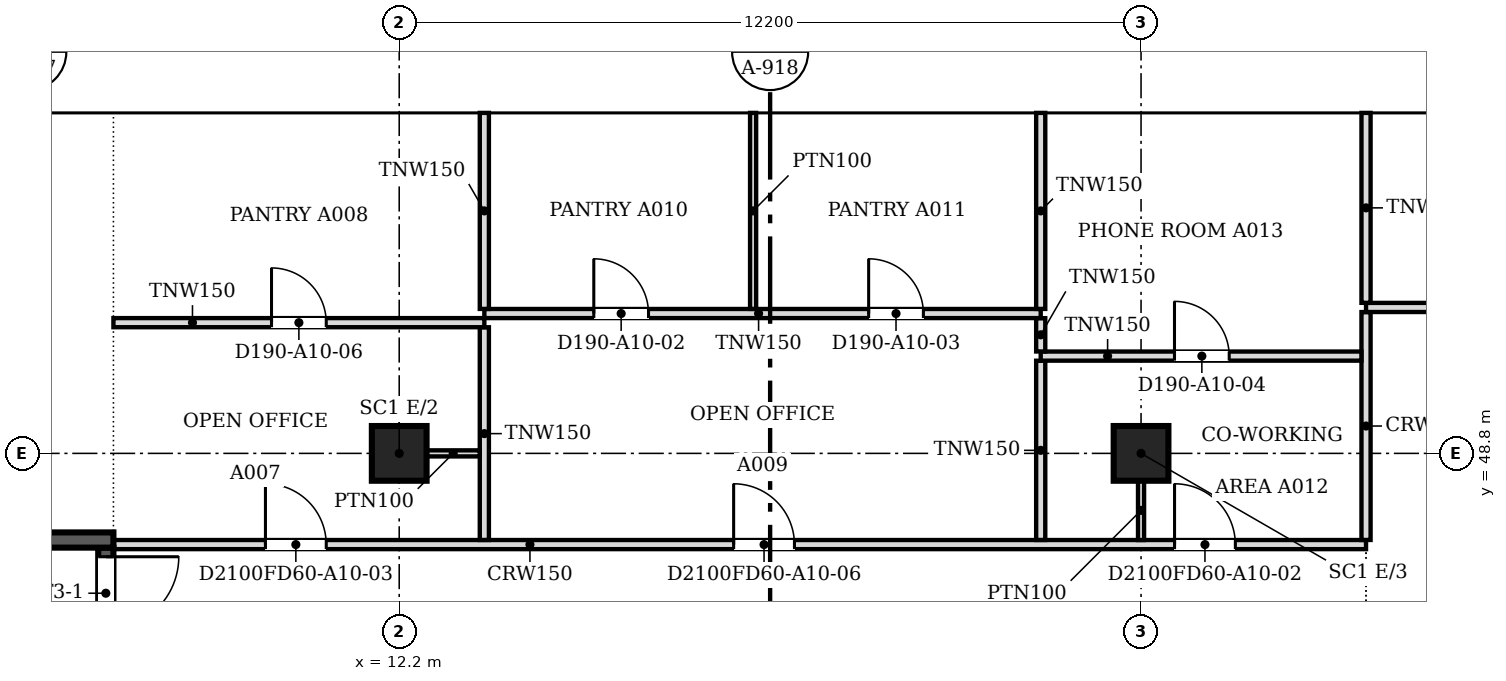
"""IFC4 building model, lengths in metres.
Left out: names, types, materials, properties, quantities, classifications, styles, units other than length and angle.
Written with IfcOpenShell. Run it as: python <this file> out.ifc"""

import sys

from ifc_helpers import new_model, si_unit, direction, frame, frame_2d, origin, origin_2d, place, context, subcontext, project, spatial, polyline, rectangle, outline, extrude, faceted_brep, source, transform, mapped, element, fill, save


model = new_model("IFC4")
c1 = context("Model", 3, precision=1e-05, world=origin(), true_north=direction((0.0, 1.0)))
c2 = subcontext(c1, "Body", "Model", "MODEL_VIEW")
j1 = project(units=[si_unit("LENGTHUNIT", "METRE"), si_unit("PLANEANGLEUNIT", "RADIAN")], contexts=[c1])
p1 = place(None, origin())
s1 = spatial("IfcSite", under=j1, at=p1, CompositionType="ELEMENT")
p2 = place(p1, origin())
s2 = spatial("IfcBuilding", under=s1, at=p2, CompositionType="ELEMENT")
p3 = place(p2, frame((0.0, 0.0, 112.6)))
s3 = spatial("IfcBuildingStorey", under=s2, at=p3, CompositionType="ELEMENT", Elevation=112.6)
for number, where, z_axis, x_axis in (
    (1, (12.2, 48.8, 0.0), (0.0, 0.0, 1.0), (1.0, 0.0, 0.0)),
    (2, (24.4, 48.8, 0.0), (0.0, 0.0, 1.0), (1.0, 0.0, 0.0)),
):
    element("IfcColumn", number, at=place(p3, frame(where, z_axis=z_axis, x_axis=x_axis)), inside=s3, PredefinedType="COLUMN", context=c2, shape_type="SweptSolid", body=[
        extrude(rectangle(XDim=0.9, YDim=0.9, at=origin_2d()), origin(), (0.0, 0.0, 1.0), 3.6),
    ])
m1 = source(origin(), c2, "Body", "SweptSolid", [
    extrude(outline(polyline([(6.1, 0.0), (3.05, 3.8), (0.0, 0.0), (6.1, 0.0)])), frame((0.0, 0.25, 0.0), z_axis=(0.0, -1.0, 0.0), x_axis=(1.0, 0.0, 0.0)), (0.0, 0.0, 1.0), 0.5),
])
p4 = place(p3, frame((33.55, 54.65, 0.0), z_axis=(0.0, 0.0, 1.0), x_axis=(-1.0, 0.0, 0.0)))
e3 = element("IfcWall", 3, at=p4, inside=s3, PredefinedType="SOLIDWALL", context=c2, shape_type="MappedRepresentation", body=[
    mapped(m1, transform((0.0, 0.0, 0.0), scale=1.0)),
])
m2 = source(origin(), c2, "Body", "SweptSolid", [
    extrude(outline(polyline([(5.579, 0.25), (3.05, 3.4), (0.521, 0.25), (5.579, 0.25)])), frame((0.0, 0.26, 0.0), z_axis=(0.0, -1.0, 0.0), x_axis=(1.0, 0.0, 0.0)), (0.0, 0.0, 1.0), 0.52),
])
p5 = place(p4, origin())
e4 = element("IfcOpeningElement", 4, at=p5, cuts=e3, PredefinedType="OPENING", context=c2, shape_type="MappedRepresentation", body=[
    mapped(m2, transform((0.0, 0.0, 0.0), scale=1.0)),
])
m3 = source(origin(), c2, "Body", "Brep", [
    faceted_brep([(6.1, -0.25, 0.0), (3.05, -0.25, 3.8), (0.0, -0.25, 0.0), (6.1, -0.25, 0.0), (0.0, 0.25, 0.0), (3.05, 0.25, 3.8), (6.1, 0.25, 0.0), (6.1, 0.25, 0.0)], [[[0, 1, 2, 3]], [[4, 5, 6, 7]], [[6, 5, 1, 0]], [[5, 4, 2, 1]], [[4, 7, 3, 2]], [[3, 7, 6, 0]]]),
])
p6 = place(p3, frame((27.45, 54.65, 0.0), z_axis=(0.0, 0.0, 1.0), x_axis=(-1.0, 0.0, 0.0)))
e5 = element("IfcWall", 5, at=p6, inside=s3, PredefinedType="SOLIDWALL", context=c2, shape_type="MappedRepresentation", body=[
    mapped(m3, transform((0.0, 0.0, 0.0), scale=1.0)),
])
p7 = place(p6, origin())
e6 = element("IfcOpeningElement", 6, at=p7, cuts=e5, PredefinedType="OPENING", context=c2, shape_type="MappedRepresentation", body=[
    mapped(m2, transform((0.0, 0.0, 0.0), scale=1.0)),
])
p8 = place(p3, frame((21.35, 54.65, 0.0), z_axis=(0.0, 0.0, 1.0), x_axis=(-1.0, 0.0, 0.0)))
e7 = element("IfcWall", 7, at=p8, inside=s3, PredefinedType="SOLIDWALL", context=c2, shape_type="MappedRepresentation", body=[
    mapped(m1, transform((0.0, 0.0, 0.0), scale=1.0)),
])
p9 = place(p8, origin())
e8 = element("IfcOpeningElement", 8, at=p9, cuts=e7, PredefinedType="OPENING", context=c2, shape_type="MappedRepresentation", body=[
    mapped(m2, transform((0.0, 0.0, 0.0), scale=1.0)),
])
p10 = place(p3, frame((15.25, 54.65, 0.0), z_axis=(0.0, 0.0, 1.0), x_axis=(-1.0, 0.0, 0.0)))
e9 = element("IfcWall", 9, at=p10, inside=s3, PredefinedType="SOLIDWALL", context=c2, shape_type="MappedRepresentation", body=[
    mapped(m1, transform((0.0, 0.0, 0.0), scale=1.0)),
])
p11 = place(p10, origin())
e10 = element("IfcOpeningElement", 10, at=p11, cuts=e9, PredefinedType="OPENING", context=c2, shape_type="MappedRepresentation", body=[
    mapped(m2, transform((0.0, 0.0, 0.0), scale=1.0)),
])
m4 = source(origin(), c2, "Body", "Brep", [
    faceted_brep([(3.05, -0.25, 3.74), (3.003, -0.25, 3.8), (0.0, -0.25, 0.0), (3.05, -0.25, 0.0), (0.0, 0.25, 0.0), (2.957, 0.25, 3.741), (2.957, 0.25, 0.0), (3.003, 0.0, 3.8)], [[[0, 1, 2, 3]], [[4, 5, 6]], [[7, 1, 0]], [[5, 4, 2, 1, 7]], [[4, 6, 3, 2]], [[3, 6, 5, 7, 0]]]),
])
p12 = place(p3, frame((9.15, 54.65, 0.0), z_axis=(0.0, 0.0, 1.0), x_axis=(-1.0, 0.0, 0.0)))
e11 = element("IfcWall", 11, at=p12, inside=s3, PredefinedType="SOLIDWALL", context=c2, shape_type="MappedRepresentation", body=[
    mapped(m4, transform((0.0, 0.0, 0.0), scale=1.0)),
])
m5 = source(origin(), c2, "Body", "SweptSolid", [
    extrude(outline(polyline([(2.803, 3.144), (0.516, 0.25), (2.803, 0.25), (2.803, 3.144)])), frame((0.0, 0.26, 0.0), z_axis=(0.0, -1.0, 0.0), x_axis=(1.0, 0.0, 0.0)), (0.0, 0.0, 1.0), 0.52),
])
p13 = place(p12, origin())
e12 = element("IfcOpeningElement", 12, at=p13, cuts=e11, PredefinedType="OPENING", context=c2, shape_type="MappedRepresentation", body=[
    mapped(m5, transform((0.0, 0.0, 0.0), scale=1.0)),
])
p14 = place(p2, frame((0.0, 0.0, 116.4)))
s4 = spatial("IfcBuildingStorey", under=s2, at=p14, CompositionType="ELEMENT", Elevation=116.4)
m6 = source(origin(), c2, "Body", "SweptSolid", [
    extrude(outline(polyline([(3.05, 0.0), (6.1, 3.8), (3.05, 7.6), (0.0, 3.8), (3.05, 0.0)])), frame((0.0, 0.25, 0.0), z_axis=(0.0, -1.0, 0.0), x_axis=(1.0, 0.0, 0.0)), (0.0, 0.0, 1.0), 0.5),
])
p15 = place(p14, frame((30.5, 54.65, -3.8), z_axis=(0.0, 0.0, 1.0), x_axis=(-1.0, 0.0, 0.0)))
e13 = element("IfcWall", 13, at=p15, inside=s4, PredefinedType="SOLIDWALL", context=c2, shape_type="MappedRepresentation", body=[
    mapped(m6, transform((0.0, 0.0, 0.0), scale=1.0)),
])
m7 = source(origin(), c2, "Body", "SweptSolid", [
    extrude(outline(polyline([(3.05, 0.399), (5.78, 3.8), (3.05, 7.2), (0.321, 3.8), (3.05, 0.399)])), frame((0.0, 0.26, 0.0), z_axis=(0.0, -1.0, 0.0), x_axis=(1.0, 0.0, 0.0)), (0.0, 0.0, 1.0), 0.52),
])
p16 = place(p15, origin())
e14 = element("IfcOpeningElement", 14, at=p16, cuts=e13, PredefinedType="OPENING", context=c2, shape_type="MappedRepresentation", body=[
    mapped(m7, transform((0.0, 0.0, 0.0), scale=1.0)),
])
m8 = source(origin(), c2, "Body", "Brep", [
    faceted_brep([(3.05, -0.25, 0.0), (6.1, -0.25, 3.8), (6.1, -0.25, 3.8), (3.05, -0.25, 7.6), (0.0, -0.25, 3.8), (0.0, 0.25, 3.8), (3.05, 0.25, 7.6), (6.1, 0.25, 3.8), (6.1, 0.25, 3.8), (3.05, 0.25, 0.0)], [[[0, 1, 2, 3, 4]], [[5, 6, 7, 8, 9]], [[9, 8, 1, 0]], [[7, 6, 3, 2]], [[6, 5, 4, 3]], [[5, 9, 0, 4]], [[1, 8, 7, 2]]]),
])
p17 = place(p14, frame((24.4, 54.65, -3.8), z_axis=(0.0, 0.0, 1.0), x_axis=(-1.0, 0.0, 0.0)))
e15 = element("IfcWall", 15, at=p17, inside=s4, PredefinedType="SOLIDWALL", context=c2, shape_type="MappedRepresentation", body=[
    mapped(m8, transform((0.0, 0.0, 0.0), scale=1.0)),
])
p18 = place(p17, origin())
e16 = element("IfcOpeningElement", 16, at=p18, cuts=e15, PredefinedType="OPENING", context=c2, shape_type="MappedRepresentation", body=[
    mapped(m7, transform((0.0, 0.0, 0.0), scale=1.0)),
])
p19 = place(p14, frame((18.3, 54.65, -3.8), z_axis=(0.0, 0.0, 1.0), x_axis=(-1.0, 0.0, 0.0)))
e17 = element("IfcWall", 17, at=p19, inside=s4, PredefinedType="SOLIDWALL", context=c2, shape_type="MappedRepresentation", body=[
    mapped(m6, transform((0.0, 0.0, 0.0), scale=1.0)),
])
p20 = place(p19, origin())
e18 = element("IfcOpeningElement", 18, at=p20, cuts=e17, PredefinedType="OPENING", context=c2, shape_type="MappedRepresentation", body=[
    mapped(m7, transform((0.0, 0.0, 0.0), scale=1.0)),
])
m9 = source(origin(), c2, "Body", "Brep", [
    faceted_brep([(3.05, -0.25, 0.0), (6.053, -0.25, 3.8), (3.05, -0.25, 7.6), (0.0, -0.25, 3.8), (0.0, 0.25, 3.8), (3.05, 0.25, 7.6), (6.007, 0.25, 3.859), (6.007, 0.25, 3.741), (3.05, 0.25, 0.0), (6.053, 0.0, 3.8)], [[[0, 1, 2, 3]], [[4, 5, 6, 7, 8]], [[8, 7, 9, 1, 0]], [[6, 5, 2, 1, 9]], [[5, 4, 3, 2]], [[4, 8, 0, 3]], [[9, 7, 6]]]),
])
p21 = place(p14, frame((12.2, 54.65, -3.8), z_axis=(0.0, 0.0, 1.0), x_axis=(-1.0, 0.0, 0.0)))
e19 = element("IfcWall", 19, at=p21, inside=s4, PredefinedType="SOLIDWALL", context=c2, shape_type="MappedRepresentation", body=[
    mapped(m9, transform((0.0, 0.0, 0.0), scale=1.0)),
])
m10 = source(origin(), c2, "Body", "SweptSolid", [
    extrude(outline(polyline([(3.049, 0.401), (5.735, 3.8), (3.049, 7.199), (0.321, 3.8), (3.049, 0.401)])), frame((0.0, 0.26, 0.0), z_axis=(0.0, -1.0, 0.0), x_axis=(1.0, 0.0, 0.0)), (0.0, 0.0, 1.0), 0.52),
])
p22 = place(p21, origin())
e20 = element("IfcOpeningElement", 20, at=p22, cuts=e19, PredefinedType="OPENING", context=c2, shape_type="MappedRepresentation", body=[
    mapped(m10, transform((0.0, 0.0, 0.0), scale=1.0)),
])
p23 = place(p3, frame((3.6, 47.375, 0.0), z_axis=(0.0, 0.0, 1.0), x_axis=(1.0, 0.0, 0.0)))
e21 = element("IfcWall", 21, at=p23, inside=s3, PredefinedType="SOLIDWALL", context=c2, shape_type="SweptSolid", body=[
    extrude(rectangle(XDim=3.9, YDim=0.25, at=frame_2d((1.95, 0.0))), origin(), (0.0, 0.0, 1.0), 3.8),
])
p24 = place(p3, frame((7.375, 47.25, 0.0), z_axis=(0.0, 0.0, 1.0), x_axis=(0.0, -1.0, 0.0)))
e22 = element("IfcWall", 22, at=p24, inside=s3, PredefinedType="SOLIDWALL", context=c2, shape_type="SweptSolid", body=[
    extrude(rectangle(XDim=8.0, YDim=0.25, at=frame_2d((4.0, 0.0))), origin(), (0.0, 0.0, 1.0), 3.8),
])
m11 = source(origin(), c2, "Body", "SweptSolid", [
    extrude(rectangle(XDim=1.2, YDim=2.1, at=frame_2d((0.6, 1.05))), frame((0.0, 0.135, 0.0), z_axis=(0.0, -1.0, 0.0), x_axis=(1.0, 0.0, 0.0)), (0.0, 0.0, 1.0), 0.27),
])
p25 = place(p24, frame((0.15, 0.0, 0.0)))
e23 = element("IfcOpeningElement", 23, at=p25, cuts=e22, PredefinedType="OPENING", context=c2, shape_type="MappedRepresentation", body=[
    mapped(m11, transform((0.0, 0.0, 0.0), scale=1.0)),
])
p26 = place(p3, frame((7.5, 47.3, 0.0), z_axis=(0.0, 0.0, 1.0), x_axis=(1.0, 0.0, 0.0)))
e24 = element("IfcWall", 24, at=p26, inside=s3, PredefinedType="PARTITIONING", context=c2, shape_type="SweptSolid", body=[
    extrude(rectangle(XDim=20.6, YDim=0.15, at=frame_2d((10.3, 0.0))), origin(), (0.0, 0.0, 1.0), 3.067),
])
m12 = source(origin(), c2, "Body", "SweptSolid", [
    extrude(rectangle(XDim=1.0, YDim=2.1, at=frame_2d((0.5, 1.05))), frame((0.0, 0.085, 0.0), z_axis=(0.0, -1.0, 0.0), x_axis=(1.0, 0.0, 0.0)), (0.0, 0.0, 1.0), 0.17),
])
p27 = place(p26, frame((17.451, 0.0, 0.0)))
e25 = element("IfcOpeningElement", 25, at=p27, cuts=e24, PredefinedType="OPENING", context=c2, shape_type="MappedRepresentation", body=[
    mapped(m12, transform((0.0, 0.0, 0.0), scale=1.0)),
])
p28 = place(p26, frame((2.5, 0.0, 0.0)))
e26 = element("IfcOpeningElement", 26, at=p28, cuts=e24, PredefinedType="OPENING", context=c2, shape_type="MappedRepresentation", body=[
    mapped(m12, transform((0.0, 0.0, 0.0), scale=1.0)),
])
p29 = place(p26, frame((10.2, 0.0, 0.0)))
e27 = element("IfcOpeningElement", 27, at=p29, cuts=e24, PredefinedType="OPENING", context=c2, shape_type="MappedRepresentation", body=[
    mapped(m12, transform((0.0, 0.0, 0.0), scale=1.0)),
])
p30 = place(p3, frame((13.6, 47.376, 0.0), z_axis=(0.0, 0.0, 1.0), x_axis=(0.0, 1.0, 0.0)))
e28 = element("IfcWall", 28, at=p30, inside=s3, PredefinedType="PARTITIONING", context=c2, shape_type="SweptSolid", body=[
    extrude(rectangle(XDim=3.498, YDim=0.15, at=frame_2d((1.749, 0.0))), origin(), (0.0, 0.0, 1.0), 3.067),
])
p31 = place(p3, frame((22.75, 47.376, 0.0), z_axis=(0.0, 0.0, 1.0), x_axis=(0.0, 1.0, 0.0)))
e29 = element("IfcWall", 29, at=p31, inside=s3, PredefinedType="PARTITIONING", context=c2, shape_type="SweptSolid", body=[
    extrude(rectangle(XDim=2.948, YDim=0.15, at=frame_2d((1.474, 0.0))), origin(), (0.0, 0.0, 1.0), 3.067),
])
p32 = place(p3, frame((28.1, 47.376, 0.0), z_axis=(0.0, 0.0, 1.0), x_axis=(0.0, 1.0, 0.0)))
e30 = element("IfcWall", 30, at=p32, inside=s3, PredefinedType="PARTITIONING", context=c2, shape_type="SweptSolid", body=[
    extrude(rectangle(XDim=3.748, YDim=0.15, at=frame_2d((1.874, 0.0))), origin(), (0.0, 0.0, 1.0), 3.067),
])
p33 = place(p3, frame((24.4, 48.35, 0.0), z_axis=(0.0, 0.0, 1.0), x_axis=(0.0, -1.0, 0.0)))
e31 = element("IfcWall", 31, at=p33, inside=s3, PredefinedType="PARTITIONING", context=c2, shape_type="SweptSolid", body=[
    extrude(rectangle(XDim=0.975, YDim=0.1, at=frame_2d((0.488, 0.0))), origin(), (0.0, 0.0, 1.0), 3.067),
])
p34 = place(p3, frame((12.65, 48.8, 0.0), z_axis=(0.0, 0.0, 1.0), x_axis=(1.0, 0.0, 0.0)))
e32 = element("IfcWall", 32, at=p34, inside=s3, PredefinedType="PARTITIONING", context=c2, shape_type="SweptSolid", body=[
    extrude(rectangle(XDim=0.875, YDim=0.1, at=frame_2d((0.438, 0.0))), origin(), (0.0, 0.0, 1.0), 3.067),
])
p35 = place(p3, frame((22.75, 50.4, 0.0), z_axis=(0.0, 0.0, 1.0), x_axis=(1.0, 0.0, 0.0)))
e33 = element("IfcWall", 33, at=p35, inside=s3, PredefinedType="PARTITIONING", context=c2, shape_type="SweptSolid", body=[
    extrude(rectangle(XDim=5.274, YDim=0.15, at=frame_2d((2.637, 0.0))), origin(), (0.0, 0.0, 1.0), 3.067),
])
m13 = source(origin(), c2, "Body", "SweptSolid", [
    extrude(rectangle(XDim=0.9, YDim=2.1, at=frame_2d((0.45, 1.05))), frame((0.0, 0.085, 0.0), z_axis=(0.0, -1.0, 0.0), x_axis=(1.0, 0.0, 0.0)), (0.0, 0.0, 1.0), 0.17),
])
p36 = place(p35, frame((2.2, 0.0, 0.0)))
e34 = element("IfcOpeningElement", 34, at=p36, cuts=e33, PredefinedType="OPENING", context=c2, shape_type="MappedRepresentation", body=[
    mapped(m13, transform((0.0, 0.0, 0.0), scale=1.0)),
])
p37 = place(p3, frame((22.75, 50.476, 0.0), z_axis=(0.0, 0.0, 1.0), x_axis=(0.0, 1.0, 0.0)))
e35 = element("IfcWall", 35, at=p37, inside=s3, PredefinedType="PARTITIONING", context=c2, shape_type="SweptSolid", body=[
    extrude(rectangle(XDim=0.548, YDim=0.15, at=frame_2d((0.274, 0.0))), origin(), (0.0, 0.0, 1.0), 3.067),
])
p38 = place(p3, frame((7.5, 50.95, 0.0), z_axis=(0.0, 0.0, 1.0), x_axis=(1.0, 0.0, 0.0)))
e36 = element("IfcWall", 36, at=p38, inside=s3, PredefinedType="PARTITIONING", context=c2, shape_type="SweptSolid", body=[
    extrude(rectangle(XDim=6.1, YDim=0.15, at=frame_2d((3.05, 0.0))), origin(), (0.0, 0.0, 1.0), 3.067),
])
p39 = place(p38, frame((2.6, 0.0, 0.0)))
e37 = element("IfcOpeningElement", 37, at=p39, cuts=e36, PredefinedType="OPENING", context=c2, shape_type="MappedRepresentation", body=[
    mapped(m13, transform((0.0, 0.0, 0.0), scale=1.0)),
])
p40 = place(p3, frame((13.6, 51.1, 0.0), z_axis=(0.0, 0.0, 1.0), x_axis=(1.0, 0.0, 0.0)))
e38 = element("IfcWall", 38, at=p40, inside=s3, PredefinedType="PARTITIONING", context=c2, shape_type="SweptSolid", body=[
    extrude(rectangle(XDim=9.15, YDim=0.15, at=frame_2d((4.575, 0.0))), origin(), (0.0, 0.0, 1.0), 3.067),
])
p41 = place(p40, frame((1.8, 0.0, 0.0)))
e39 = element("IfcOpeningElement", 39, at=p41, cuts=e38, PredefinedType="OPENING", context=c2, shape_type="MappedRepresentation", body=[
    mapped(m13, transform((0.0, 0.0, 0.0), scale=1.0)),
])
p42 = place(p40, frame((6.32, 0.0, 0.0)))
e40 = element("IfcOpeningElement", 40, at=p42, cuts=e38, PredefinedType="OPENING", context=c2, shape_type="MappedRepresentation", body=[
    mapped(m13, transform((0.0, 0.0, 0.0), scale=1.0)),
])
p43 = place(p3, frame((13.6, 51.176, 0.0), z_axis=(0.0, 0.0, 1.0), x_axis=(0.0, 1.0, 0.0)))
e41 = element("IfcWall", 41, at=p43, inside=s3, PredefinedType="PARTITIONING", context=c2, shape_type="SweptSolid", body=[
    extrude(rectangle(XDim=3.224, YDim=0.15, at=frame_2d((1.612, 0.0))), origin(), (0.0, 0.0, 1.0), 3.067),
])
p44 = place(p3, frame((18.02, 51.176, 0.0), z_axis=(0.0, 0.0, 1.0), x_axis=(0.0, 1.0, 0.0)))
e42 = element("IfcWall", 42, at=p44, inside=s3, PredefinedType="PARTITIONING", context=c2, shape_type="SweptSolid", body=[
    extrude(rectangle(XDim=3.224, YDim=0.1, at=frame_2d((1.612, 0.0))), origin(), (0.0, 0.0, 1.0), 3.067),
])
p45 = place(p3, frame((22.75, 51.176, 0.0), z_axis=(0.0, 0.0, 1.0), x_axis=(0.0, 1.0, 0.0)))
e43 = element("IfcWall", 43, at=p45, inside=s3, PredefinedType="PARTITIONING", context=c2, shape_type="SweptSolid", body=[
    extrude(rectangle(XDim=3.224, YDim=0.15, at=frame_2d((1.612, 0.0))), origin(), (0.0, 0.0, 1.0), 3.067),
])
p46 = place(p3, frame((28.1, 51.2, 0.0), z_axis=(0.0, 0.0, 1.0), x_axis=(1.0, 0.0, 0.0)))
e44 = element("IfcWall", 44, at=p46, inside=s3, PredefinedType="PARTITIONING", context=c2, shape_type="SweptSolid", body=[
    extrude(rectangle(XDim=31.438, YDim=0.15, at=frame_2d((15.719, 0.0))), origin(), (0.0, 0.0, 1.0), 3.067),
])
p47 = place(p46, frame((5.6, 0.0, 0.0)))
e45 = element("IfcOpeningElement", 45, at=p47, cuts=e44, PredefinedType="OPENING", context=c2, shape_type="MappedRepresentation", body=[
    mapped(m13, transform((0.0, 0.0, 0.0), scale=1.0)),
])
p48 = place(p46, frame((21.4, 0.0, 0.0)))
e46 = element("IfcOpeningElement", 46, at=p48, cuts=e44, PredefinedType="OPENING", context=c2, shape_type="MappedRepresentation", body=[
    mapped(m13, transform((0.0, 0.0, 0.0), scale=1.0)),
])
p49 = place(p3, frame((28.1, 51.276, 0.0), z_axis=(0.0, 0.0, 1.0), x_axis=(0.0, 1.0, 0.0)))
e47 = element("IfcWall", 47, at=p49, inside=s3, PredefinedType="PARTITIONING", context=c2, shape_type="SweptSolid", body=[
    extrude(rectangle(XDim=3.124, YDim=0.15, at=frame_2d((1.562, 0.0))), origin(), (0.0, 0.0, 1.0), 3.067),
])
m14 = source(origin(), c2, "Body", "SweptSolid", [
    extrude(rectangle(XDim=1.2, YDim=2.1, at=frame_2d((0.6, 1.05))), frame((0.0, 0.025, 0.0), z_axis=(0.0, -1.0, 0.0), x_axis=(1.0, 0.0, 0.0)), (0.0, 0.0, 1.0), 0.05),
])
p50 = place(p25, origin())
e48 = element("IfcDoor", 48, at=p50, inside=s3, OperationType="SINGLE_SWING_LEFT", PredefinedType="DOOR", context=c2, shape_type="MappedRepresentation", body=[
    mapped(m14, transform((0.0, 0.0, 0.0), scale=1.0)),
])
fill(e23, e48)
m15 = source(origin(), c2, "Body", "SweptSolid", [
    extrude(rectangle(XDim=0.9, YDim=2.1, at=frame_2d((0.45, 1.05))), frame((0.0, 0.025, 0.0), z_axis=(0.0, -1.0, 0.0), x_axis=(1.0, 0.0, 0.0)), (0.0, 0.0, 1.0), 0.05),
])
p51 = place(p41, origin())
e49 = element("IfcDoor", 49, at=p51, inside=s3, OperationType="SINGLE_SWING_LEFT", PredefinedType="DOOR", context=c2, shape_type="MappedRepresentation", body=[
    mapped(m15, transform((0.0, 0.0, 0.0), scale=1.0)),
])
fill(e39, e49)
p52 = place(p42, origin())
e50 = element("IfcDoor", 50, at=p52, inside=s3, OperationType="SINGLE_SWING_LEFT", PredefinedType="DOOR", context=c2, shape_type="MappedRepresentation", body=[
    mapped(m15, transform((0.0, 0.0, 0.0), scale=1.0)),
])
fill(e40, e50)
p53 = place(p36, origin())
e51 = element("IfcDoor", 51, at=p53, inside=s3, OperationType="SINGLE_SWING_LEFT", PredefinedType="DOOR", context=c2, shape_type="MappedRepresentation", body=[
    mapped(m15, transform((0.0, 0.0, 0.0), scale=1.0)),
])
fill(e34, e51)
m16 = source(origin(), c2, "Body", "SweptSolid", [
    extrude(rectangle(XDim=1.0, YDim=2.1, at=frame_2d((0.5, 1.05))), frame((0.0, 0.025, 0.0), z_axis=(0.0, -1.0, 0.0), x_axis=(1.0, 0.0, 0.0)), (0.0, 0.0, 1.0), 0.05),
])
p54 = place(p27, origin())
e52 = element("IfcDoor", 52, at=p54, inside=s3, OperationType="SINGLE_SWING_LEFT", PredefinedType="DOOR", context=c2, shape_type="MappedRepresentation", body=[
    mapped(m16, transform((0.0, 0.0, 0.0), scale=1.0)),
])
fill(e25, e52)
p55 = place(p28, origin())
e53 = element("IfcDoor", 53, at=p55, inside=s3, OperationType="SINGLE_SWING_LEFT", PredefinedType="DOOR", context=c2, shape_type="MappedRepresentation", body=[
    mapped(m16, transform((0.0, 0.0, 0.0), scale=1.0)),
])
fill(e26, e53)
p56 = place(p39, origin())
e54 = element("IfcDoor", 54, at=p56, inside=s3, OperationType="SINGLE_SWING_LEFT", PredefinedType="DOOR", context=c2, shape_type="MappedRepresentation", body=[
    mapped(m15, transform((0.0, 0.0, 0.0), scale=1.0)),
])
fill(e37, e54)
p57 = place(p29, origin())
e55 = element("IfcDoor", 55, at=p57, inside=s3, OperationType="SINGLE_SWING_LEFT", PredefinedType="DOOR", context=c2, shape_type="MappedRepresentation", body=[
    mapped(m16, transform((0.0, 0.0, 0.0), scale=1.0)),
])
fill(e27, e55)
save(model, sys.argv[1])
